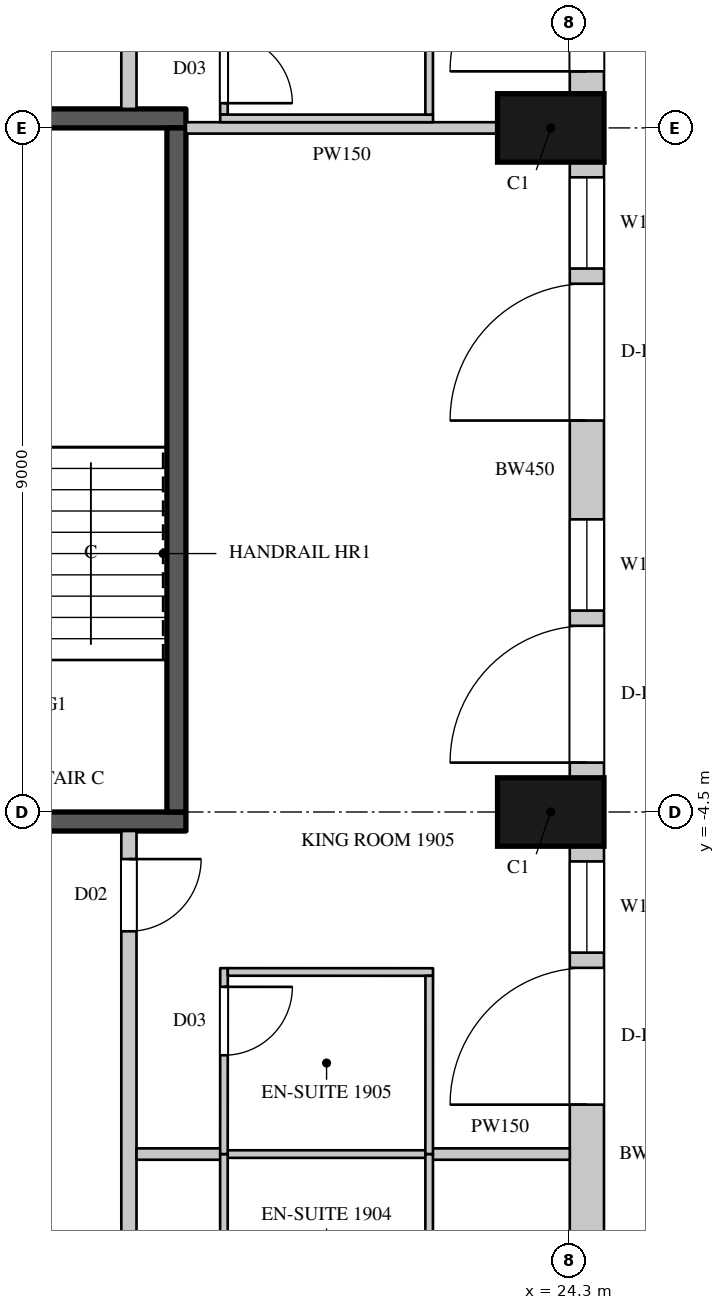
"""IFC4 building model, lengths in metres.
Left out: names, types, materials, properties, quantities, classifications, styles, units other than length and angle.
Written with IfcOpenShell. Run it as: python <this file> out.ifc"""

import sys

from ifc_helpers import new_model, si_unit, direction, frame, frame_2d, origin, origin_2d, place, context, subcontext, project, spatial, rectangle, extrude, element, fill, save


model = new_model("IFC4")
c1 = context("Model", 3, precision=1e-05, world=origin(), true_north=direction((0.0, 1.0)))
c2 = subcontext(c1, "Body", "Model", "MODEL_VIEW")
j1 = project(units=[si_unit("LENGTHUNIT", "METRE"), si_unit("PLANEANGLEUNIT", "RADIAN")], contexts=[c1])
p1 = place(None, origin())
s1 = spatial("IfcSite", under=j1, at=p1, CompositionType="ELEMENT")
p2 = place(p1, origin())
s2 = spatial("IfcBuilding", under=s1, at=p2, CompositionType="ELEMENT")
p3 = place(p2, frame((0.0, 0.0, 98.7)))
s3 = spatial("IfcBuildingStorey", under=s2, at=p3, CompositionType="ELEMENT", Elevation=98.7)
for number, where, z_axis, x_axis in (
    (1, (24.05, -4.5, 0.0), (0.0, 0.0, 1.0), (0.0, 1.0, 0.0)),
    (2, (24.05, 4.5, 0.0), (0.0, 0.0, 1.0), (0.0, 1.0, 0.0)),
):
    element("IfcColumn", number, at=place(p3, frame(where, z_axis=z_axis, x_axis=x_axis)), inside=s3, PredefinedType="COLUMN", context=c2, shape_type="SweptSolid", body=[
        extrude(rectangle(XDim=0.9, YDim=1.4, at=origin_2d()), origin(), (0.0, 0.0, 1.0), 3.6),
    ])
p4 = place(p3, frame((24.525, -13.05, 0.0), z_axis=(0.0, 0.0, 1.0), x_axis=(0.0, 1.0, 0.0)))
e3 = element("IfcWall", 3, at=p4, inside=s3, PredefinedType="SOLIDWALL", context=c2, shape_type="SweptSolid", body=[
    extrude(rectangle(XDim=8.1, YDim=0.45, at=frame_2d((4.05, 0.0))), origin(), (0.0, 0.0, 1.0), 3.3),
])
p5 = place(p4, frame((0.9, 0.0, 0.0)))
e4 = element("IfcOpeningElement", 4, at=p5, cuts=e3, PredefinedType="OPENING", context=c2, shape_type="SweptSolid", body=[
    extrude(rectangle(XDim=1.8, YDim=2.4, at=frame_2d((0.9, 1.2))), frame((0.0, 0.235, 0.0), z_axis=(0.0, -1.0, 0.0), x_axis=(1.0, 0.0, 0.0)), (0.0, 0.0, 1.0), 0.47),
])
p6 = place(p4, frame((4.7, 0.0, 0.0)))
e5 = element("IfcOpeningElement", 5, at=p6, cuts=e3, PredefinedType="OPENING", context=c2, shape_type="SweptSolid", body=[
    extrude(rectangle(XDim=1.8, YDim=2.4, at=frame_2d((0.9, 1.2))), frame((0.0, 0.235, 0.0), z_axis=(0.0, -1.0, 0.0), x_axis=(1.0, 0.0, 0.0)), (0.0, 0.0, 1.0), 0.47),
])
p7 = place(p4, frame((6.7, 0.0, 1.05)))
e6 = element("IfcOpeningElement", 6, at=p7, cuts=e3, PredefinedType="OPENING", context=c2, shape_type="SweptSolid", body=[
    extrude(rectangle(XDim=1.2, YDim=2.0, at=frame_2d((0.6, 1.0))), frame((0.0, 0.235, 0.0), z_axis=(0.0, -1.0, 0.0), x_axis=(1.0, 0.0, 0.0)), (0.0, 0.0, 1.0), 0.47),
])
p8 = place(p3, frame((24.525, -4.05, 0.0), z_axis=(0.0, 0.0, 1.0), x_axis=(0.0, 1.0, 0.0)))
e7 = element("IfcWall", 7, at=p8, inside=s3, PredefinedType="SOLIDWALL", context=c2, shape_type="SweptSolid", body=[
    extrude(rectangle(XDim=8.1, YDim=0.45, at=frame_2d((4.05, 0.0))), origin(), (0.0, 0.0, 1.0), 3.3),
])
p9 = place(p8, frame((0.2, 0.0, 0.0)))
e8 = element("IfcOpeningElement", 8, at=p9, cuts=e7, PredefinedType="OPENING", context=c2, shape_type="SweptSolid", body=[
    extrude(rectangle(XDim=1.8, YDim=2.4, at=frame_2d((0.9, 1.2))), frame((0.0, 0.235, 0.0), z_axis=(0.0, -1.0, 0.0), x_axis=(1.0, 0.0, 0.0)), (0.0, 0.0, 1.0), 0.47),
])
p10 = place(p8, frame((2.2, 0.0, 1.05)))
e9 = element("IfcOpeningElement", 9, at=p10, cuts=e7, PredefinedType="OPENING", context=c2, shape_type="SweptSolid", body=[
    extrude(rectangle(XDim=1.2, YDim=2.0, at=frame_2d((0.6, 1.0))), frame((0.0, 0.235, 0.0), z_axis=(0.0, -1.0, 0.0), x_axis=(1.0, 0.0, 0.0)), (0.0, 0.0, 1.0), 0.47),
])
p11 = place(p8, frame((4.7, 0.0, 0.0)))
e10 = element("IfcOpeningElement", 10, at=p11, cuts=e7, PredefinedType="OPENING", context=c2, shape_type="SweptSolid", body=[
    extrude(rectangle(XDim=1.8, YDim=2.4, at=frame_2d((0.9, 1.2))), frame((0.0, 0.235, 0.0), z_axis=(0.0, -1.0, 0.0), x_axis=(1.0, 0.0, 0.0)), (0.0, 0.0, 1.0), 0.47),
])
p12 = place(p8, frame((6.7, 0.0, 1.05)))
e11 = element("IfcOpeningElement", 11, at=p12, cuts=e7, PredefinedType="OPENING", context=c2, shape_type="SweptSolid", body=[
    extrude(rectangle(XDim=1.2, YDim=2.0, at=frame_2d((0.6, 1.0))), frame((0.0, 0.235, 0.0), z_axis=(0.0, -1.0, 0.0), x_axis=(1.0, 0.0, 0.0)), (0.0, 0.0, 1.0), 0.47),
])
p13 = place(p3, frame((24.525, 4.95, 0.0), z_axis=(0.0, 0.0, 1.0), x_axis=(0.0, 1.0, 0.0)))
e12 = element("IfcWall", 12, at=p13, inside=s3, PredefinedType="SOLIDWALL", context=c2, shape_type="SweptSolid", body=[
    extrude(rectangle(XDim=8.439, YDim=0.45, at=frame_2d((4.219, 0.0))), origin(), (0.0, 0.0, 1.0), 3.3),
])
p14 = place(p13, frame((0.294, 0.0, 0.0)))
e13 = element("IfcOpeningElement", 13, at=p14, cuts=e12, PredefinedType="OPENING", context=c2, shape_type="SweptSolid", body=[
    extrude(rectangle(XDim=1.8, YDim=2.4, at=frame_2d((0.9, 1.2))), frame((0.0, 0.235, 0.0), z_axis=(0.0, -1.0, 0.0), x_axis=(1.0, 0.0, 0.0)), (0.0, 0.0, 1.0), 0.47),
])
p15 = place(p13, frame((2.294, 0.0, 1.05)))
e14 = element("IfcOpeningElement", 14, at=p15, cuts=e12, PredefinedType="OPENING", context=c2, shape_type="SweptSolid", body=[
    extrude(rectangle(XDim=1.2, YDim=2.0, at=frame_2d((0.6, 1.0))), frame((0.0, 0.235, 0.0), z_axis=(0.0, -1.0, 0.0), x_axis=(1.0, 0.0, 0.0)), (0.0, 0.0, 1.0), 0.47),
])
p16 = place(p13, frame((5.232, 0.0, 1.05)))
e15 = element("IfcOpeningElement", 15, at=p16, cuts=e12, PredefinedType="OPENING", context=c2, shape_type="SweptSolid", body=[
    extrude(rectangle(XDim=2.7, YDim=2.0, at=frame_2d((1.35, 1.0))), frame((0.0, 0.235, 0.0), z_axis=(0.0, -1.0, 0.0), x_axis=(1.0, 0.0, 0.0)), (0.0, 0.0, 1.0), 0.47),
])
p17 = place(p3, frame((18.5, -18.869, 0.0), z_axis=(0.0, 0.0, 1.0), x_axis=(0.0, 1.0, 0.0)))
e16 = element("IfcWall", 16, at=p17, inside=s3, PredefinedType="PARTITIONING", context=c2, shape_type="SweptSolid", body=[
    extrude(rectangle(XDim=14.119, YDim=0.2, at=frame_2d((7.06, 0.0))), origin(), (0.0, 0.0, 1.0), 3.3),
])
p18 = place(p17, frame((3.4, 0.0, 0.0)))
e17 = element("IfcOpeningElement", 17, at=p18, cuts=e16, PredefinedType="OPENING", context=c2, shape_type="SweptSolid", body=[
    extrude(rectangle(XDim=0.95, YDim=2.2, at=frame_2d((0.475, 1.1))), frame((0.0, 0.11, 0.0), z_axis=(0.0, -1.0, 0.0), x_axis=(1.0, 0.0, 0.0)), (0.0, 0.0, 1.0), 0.22),
])
p19 = place(p17, frame((12.8, 0.0, 0.0)))
e18 = element("IfcOpeningElement", 18, at=p19, cuts=e16, PredefinedType="OPENING", context=c2, shape_type="SweptSolid", body=[
    extrude(rectangle(XDim=0.95, YDim=2.2, at=frame_2d((0.475, 1.1))), frame((0.0, 0.11, 0.0), z_axis=(0.0, -1.0, 0.0), x_axis=(1.0, 0.0, 0.0)), (0.0, 0.0, 1.0), 0.22),
])
p20 = place(p3, frame((18.5, 4.75, 0.0), z_axis=(0.0, 0.0, 1.0), x_axis=(0.0, 1.0, 0.0)))
e19 = element("IfcWall", 19, at=p20, inside=s3, PredefinedType="PARTITIONING", context=c2, shape_type="SweptSolid", body=[
    extrude(rectangle(XDim=14.434, YDim=0.2, at=frame_2d((7.217, 0.0))), origin(), (0.0, 0.0, 1.0), 3.3),
])
p21 = place(p20, frame((7.65, 0.0, 0.0)))
e20 = element("IfcOpeningElement", 20, at=p21, cuts=e19, PredefinedType="OPENING", context=c2, shape_type="SweptSolid", body=[
    extrude(rectangle(XDim=0.95, YDim=2.2, at=frame_2d((0.475, 1.1))), frame((0.0, 0.11, 0.0), z_axis=(0.0, -1.0, 0.0), x_axis=(1.0, 0.0, 0.0)), (0.0, 0.0, 1.0), 0.22),
])
p22 = place(p3, frame((18.6, -9.0, 0.0), z_axis=(0.0, 0.0, 1.0), x_axis=(1.0, 0.0, 0.0)))
e21 = element("IfcWall", 21, at=p22, inside=s3, PredefinedType="PARTITIONING", context=c2, shape_type="SweptSolid", body=[
    extrude(rectangle(XDim=1.13, YDim=0.15, at=frame_2d((0.565, 0.0))), origin(), (0.0, 0.0, 1.0), 2.65),
])
p23 = place(p3, frame((19.25, 4.5, 0.0), z_axis=(0.0, 0.0, 1.0), x_axis=(1.0, 0.0, 0.0)))
e22 = element("IfcWall", 22, at=p23, inside=s3, PredefinedType="PARTITIONING", context=c2, shape_type="SweptSolid", body=[
    extrude(rectangle(XDim=4.1, YDim=0.15, at=frame_2d((2.05, 0.0))), origin(), (0.0, 0.0, 1.0), 3.3),
])
p24 = place(p3, frame((22.47, -9.0, 0.0), z_axis=(0.0, 0.0, 1.0), x_axis=(1.0, 0.0, 0.0)))
e23 = element("IfcWall", 23, at=p24, inside=s3, PredefinedType="PARTITIONING", context=c2, shape_type="SweptSolid", body=[
    extrude(rectangle(XDim=1.83, YDim=0.15, at=frame_2d((0.915, 0.0))), origin(), (0.0, 0.0, 1.0), 2.65),
])
for number, where, z_axis, x_axis in (
    (24, (14.55, -4.625, 0.0), (0.0, 0.0, 1.0), (1.0, 0.0, 0.0)),
    (25, (14.55, 4.625, 0.0), (0.0, 0.0, 1.0), (1.0, 0.0, 0.0)),
):
    element("IfcWall", number, at=place(p3, frame(where, z_axis=z_axis, x_axis=x_axis)), inside=s3, PredefinedType="SHEAR", context=c2, shape_type="SweptSolid", body=[
        extrude(rectangle(XDim=4.7, YDim=0.25, at=frame_2d((2.35, 0.0))), origin(), (0.0, 0.0, 1.0), 3.3),
    ])
p25 = place(p3, frame((19.125, -4.5, 0.0), z_axis=(0.0, 0.0, 1.0), x_axis=(0.0, 1.0, 0.0)))
e26 = element("IfcWall", 26, at=p25, inside=s3, PredefinedType="SHEAR", context=c2, shape_type="SweptSolid", body=[
    extrude(rectangle(XDim=9.0, YDim=0.25, at=frame_2d((4.5, 0.0))), origin(), (0.0, 0.0, 1.0), 3.3),
])
p26 = place(p3, frame((19.73, -9.0, 0.0), z_axis=(0.0, 0.0, 1.0), x_axis=(1.0, 0.0, 0.0)))
e27 = element("IfcWall", 27, at=p26, inside=s3, PredefinedType="PARTITIONING", context=c2, shape_type="SweptSolid", body=[
    extrude(rectangle(XDim=2.74, YDim=0.1, at=frame_2d((1.37, 0.0))), origin(), (0.0, 0.0, 1.0), 2.65),
])
p27 = place(p3, frame((19.75, -11.346, 0.0), z_axis=(0.0, 0.0, 1.0), x_axis=(0.0, 1.0, 0.0)))
e28 = element("IfcWall", 28, at=p27, inside=s3, PredefinedType="PARTITIONING", context=c2, shape_type="SweptSolid", body=[
    extrude(rectangle(XDim=2.346, YDim=0.1, at=frame_2d((1.173, 0.0))), origin(), (0.0, 0.0, 1.0), 3.3),
])
p28 = place(p27, frame((0.15, 0.0, 0.0)))
e29 = element("IfcOpeningElement", 29, at=p28, cuts=e28, PredefinedType="OPENING", context=c2, shape_type="SweptSolid", body=[
    extrude(rectangle(XDim=0.9, YDim=2.2, at=frame_2d((0.45, 1.1))), frame((0.0, 0.06, 0.0), z_axis=(0.0, -1.0, 0.0), x_axis=(1.0, 0.0, 0.0)), (0.0, 0.0, 1.0), 0.12),
])
p29 = place(p3, frame((19.75, -9.0, 0.0), z_axis=(0.0, 0.0, 1.0), x_axis=(0.000399241409, 0.999999920303, 0.0)))
e30 = element("IfcWall", 30, at=p29, inside=s3, PredefinedType="PARTITIONING", context=c2, shape_type="SweptSolid", body=[
    extrude(rectangle(XDim=2.446, YDim=0.1, at=frame_2d((1.223, 0.0))), origin(), (0.0, 0.0, 1.0), 3.3),
])
p30 = place(p29, frame((1.3, 0.0, 0.0)))
e31 = element("IfcOpeningElement", 31, at=p30, cuts=e30, PredefinedType="OPENING", context=c2, shape_type="SweptSolid", body=[
    extrude(rectangle(XDim=0.9, YDim=2.2, at=frame_2d((0.45, 1.1))), frame((0.0, 0.06, 0.0), z_axis=(0.0, -1.0, 0.0), x_axis=(1.0, 0.0, 0.0)), (0.0, 0.0, 1.0), 0.12),
])
p31 = place(p3, frame((19.75, 4.675, 0.0), z_axis=(0.0, 0.0, 1.0), x_axis=(0.0, 1.0, 0.0)))
e32 = element("IfcWall", 32, at=p31, inside=s3, PredefinedType="PARTITIONING", context=c2, shape_type="SweptSolid", body=[
    extrude(rectangle(XDim=2.3, YDim=0.1, at=frame_2d((1.15, 0.0))), origin(), (0.0, 0.0, 1.0), 3.3),
])
p32 = place(p31, frame((0.15, 0.0, 0.0)))
e33 = element("IfcOpeningElement", 33, at=p32, cuts=e32, PredefinedType="OPENING", context=c2, shape_type="SweptSolid", body=[
    extrude(rectangle(XDim=0.9, YDim=2.2, at=frame_2d((0.45, 1.1))), frame((0.0, 0.06, 0.0), z_axis=(0.0, -1.0, 0.0), x_axis=(1.0, 0.0, 0.0)), (0.0, 0.0, 1.0), 0.12),
])
p33 = place(p3, frame((19.801, -6.604, 0.0), z_axis=(0.0, 0.0, 1.0), x_axis=(0.999999934588, -0.000361696332, 0.0)))
e34 = element("IfcWall", 34, at=p33, inside=s3, PredefinedType="PARTITIONING", context=c2, shape_type="SweptSolid", body=[
    extrude(rectangle(XDim=2.7, YDim=0.1, at=frame_2d((1.35, 0.0))), origin(), (0.0, 0.0, 1.0), 3.3),
])
p34 = place(p3, frame((19.701, 4.625, 0.0), z_axis=(0.0, 0.0, 1.0), x_axis=(1.0, 0.0, 0.0)))
e35 = element("IfcWall", 35, at=p34, inside=s3, PredefinedType="PARTITIONING", context=c2, shape_type="SweptSolid", body=[
    extrude(rectangle(XDim=2.8, YDim=0.1, at=frame_2d((1.4, 0.0))), origin(), (0.0, 0.0, 1.0), 3.3),
])
p35 = place(p3, frame((22.45, -11.346, 0.0), z_axis=(0.0, 0.0, 1.0), x_axis=(0.0, 1.0, 0.0)))
e36 = element("IfcWall", 36, at=p35, inside=s3, PredefinedType="PARTITIONING", context=c2, shape_type="SweptSolid", body=[
    extrude(rectangle(XDim=2.346, YDim=0.1, at=frame_2d((1.173, 0.0))), origin(), (0.0, 0.0, 1.0), 3.3),
])
p36 = place(p3, frame((22.45, -9.0, 0.0), z_axis=(0.0, 0.0, 1.0), x_axis=(0.00041644973, 0.999999913285, 0.0)))
e37 = element("IfcWall", 37, at=p36, inside=s3, PredefinedType="PARTITIONING", context=c2, shape_type="SweptSolid", body=[
    extrude(rectangle(XDim=2.345, YDim=0.1, at=frame_2d((1.172, 0.0))), origin(), (0.0, 0.0, 1.0), 3.3),
])
p37 = place(p3, frame((22.45, 4.675, 0.0), z_axis=(0.0, 0.0, 1.0), x_axis=(0.0, 1.0, 0.0)))
e38 = element("IfcWall", 38, at=p37, inside=s3, PredefinedType="PARTITIONING", context=c2, shape_type="SweptSolid", body=[
    extrude(rectangle(XDim=2.3, YDim=0.1, at=frame_2d((1.15, 0.0))), origin(), (0.0, 0.0, 1.0), 3.3),
])
p38 = place(p6, origin())
e39 = element("IfcDoor", 39, at=p38, inside=s3, OperationType="SLIDING_TO_LEFT", PredefinedType="DOOR", context=c2, shape_type="SweptSolid", body=[
    extrude(rectangle(XDim=1.8, YDim=2.4, at=frame_2d((0.9, 1.2))), frame((0.0, 0.13, 0.0), z_axis=(0.0, -1.0, 0.0), x_axis=(1.0, 0.0, 0.0)), (0.0, 0.0, 1.0), 0.05),
])
fill(e5, e39)
p39 = place(p7, origin())
e40 = element("IfcWindow", 40, at=p39, inside=s3, PartitioningType="SINGLE_PANEL", PredefinedType="WINDOW", context=c2, shape_type="SweptSolid", body=[
    extrude(rectangle(XDim=1.2, YDim=2.0, at=frame_2d((0.6, 1.0))), frame((0.0, 0.135, 0.0), z_axis=(0.0, -1.0, 0.0), x_axis=(1.0, 0.0, 0.0)), (0.0, 0.0, 1.0), 0.06),
])
fill(e6, e40)
p40 = place(p9, origin())
e41 = element("IfcDoor", 41, at=p40, inside=s3, OperationType="SLIDING_TO_LEFT", PredefinedType="DOOR", context=c2, shape_type="SweptSolid", body=[
    extrude(rectangle(XDim=1.8, YDim=2.4, at=frame_2d((0.9, 1.2))), frame((0.0, 0.13, 0.0), z_axis=(0.0, -1.0, 0.0), x_axis=(1.0, 0.0, 0.0)), (0.0, 0.0, 1.0), 0.05),
])
fill(e8, e41)
p41 = place(p10, origin())
e42 = element("IfcWindow", 42, at=p41, inside=s3, PartitioningType="SINGLE_PANEL", PredefinedType="WINDOW", context=c2, shape_type="SweptSolid", body=[
    extrude(rectangle(XDim=1.2, YDim=2.0, at=frame_2d((0.6, 1.0))), frame((0.0, 0.135, 0.0), z_axis=(0.0, -1.0, 0.0), x_axis=(1.0, 0.0, 0.0)), (0.0, 0.0, 1.0), 0.06),
])
fill(e9, e42)
p42 = place(p11, origin())
e43 = element("IfcDoor", 43, at=p42, inside=s3, OperationType="SLIDING_TO_LEFT", PredefinedType="DOOR", context=c2, shape_type="SweptSolid", body=[
    extrude(rectangle(XDim=1.8, YDim=2.4, at=frame_2d((0.9, 1.2))), frame((0.0, 0.13, 0.0), z_axis=(0.0, -1.0, 0.0), x_axis=(1.0, 0.0, 0.0)), (0.0, 0.0, 1.0), 0.05),
])
fill(e10, e43)
p43 = place(p12, origin())
e44 = element("IfcWindow", 44, at=p43, inside=s3, PartitioningType="SINGLE_PANEL", PredefinedType="WINDOW", context=c2, shape_type="SweptSolid", body=[
    extrude(rectangle(XDim=1.2, YDim=2.0, at=frame_2d((0.6, 1.0))), frame((0.0, 0.135, 0.0), z_axis=(0.0, -1.0, 0.0), x_axis=(1.0, 0.0, 0.0)), (0.0, 0.0, 1.0), 0.06),
])
fill(e11, e44)
p44 = place(p14, origin())
e45 = element("IfcDoor", 45, at=p44, inside=s3, OperationType="SLIDING_TO_LEFT", PredefinedType="DOOR", context=c2, shape_type="SweptSolid", body=[
    extrude(rectangle(XDim=1.8, YDim=2.4, at=frame_2d((0.9, 1.2))), frame((0.0, 0.13, 0.0), z_axis=(0.0, -1.0, 0.0), x_axis=(1.0, 0.0, 0.0)), (0.0, 0.0, 1.0), 0.05),
])
fill(e13, e45)
p45 = place(p19, origin())
e46 = element("IfcDoor", 46, at=p45, inside=s3, OperationType="SINGLE_SWING_LEFT", PredefinedType="DOOR", context=c2, shape_type="SweptSolid", body=[
    extrude(rectangle(XDim=0.95, YDim=2.2, at=frame_2d((0.475, 1.1))), frame((0.0, 0.025, 0.0), z_axis=(0.0, -1.0, 0.0), x_axis=(1.0, 0.0, 0.0)), (0.0, 0.0, 1.0), 0.05),
])
fill(e18, e46)
p46 = place(p30, origin())
e47 = element("IfcDoor", 47, at=p46, inside=s3, OperationType="SINGLE_SWING_LEFT", PredefinedType="DOOR", context=c2, shape_type="SweptSolid", body=[
    extrude(rectangle(XDim=0.9, YDim=2.2, at=frame_2d((0.45, 1.1))), frame((0.0, 0.025, 0.0), z_axis=(0.0, -1.0, 0.0), x_axis=(1.0, 0.0, 0.0)), (0.0, 0.0, 1.0), 0.05),
])
fill(e31, e47)
p47 = place(p32, origin())
e48 = element("IfcDoor", 48, at=p47, inside=s3, OperationType="SINGLE_SWING_RIGHT", PredefinedType="DOOR", context=c2, shape_type="SweptSolid", body=[
    extrude(rectangle(XDim=0.9, YDim=2.2, at=frame_2d((0.45, 1.1))), frame((0.0, 0.025, 0.0), z_axis=(0.0, -1.0, 0.0), x_axis=(1.0, 0.0, 0.0)), (0.0, 0.0, 1.0), 0.05),
])
fill(e33, e48)
save(model, sys.argv[1])
